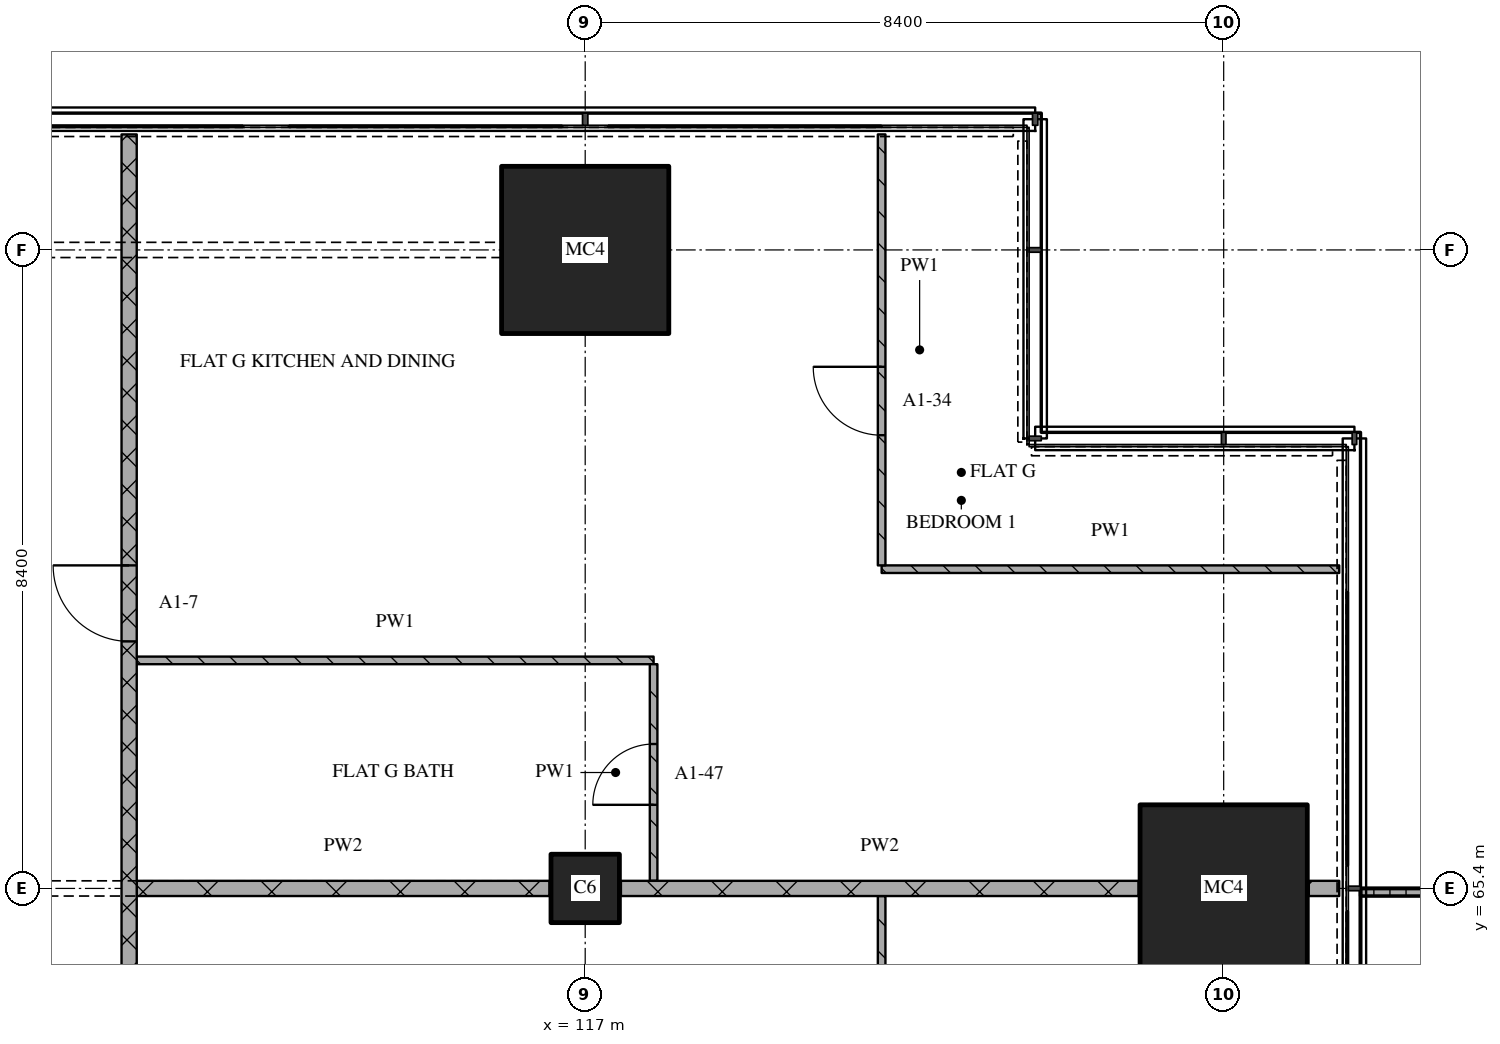
"""IFC4 building model, lengths in metres.
Left out: names, types, materials, properties, quantities, classifications, styles, units other than length and angle.
Written with IfcOpenShell. Run it as: python <this file> out.ifc"""

import sys

from ifc_helpers import new_model, si_unit, direction, frame, frame_2d, origin, origin_2d, place, context, subcontext, project, spatial, polyline, rectangle, outline, extrude, element, fill, save


model = new_model("IFC4")
c1 = context("Model", 3, precision=1e-05, world=origin(), true_north=direction((0.0, 1.0)))
c2 = subcontext(c1, "Body", "Model", "MODEL_VIEW")
j1 = project(units=[si_unit("LENGTHUNIT", "METRE"), si_unit("PLANEANGLEUNIT", "RADIAN")], contexts=[c1])
p1 = place(None, origin())
s1 = spatial("IfcSite", under=j1, at=p1, CompositionType="ELEMENT")
p2 = place(p1, origin())
s2 = spatial("IfcBuilding", under=s1, at=p2, CompositionType="ELEMENT")
p3 = place(p2, frame((0.0, 0.0, 44.4)))
s3 = spatial("IfcBuildingStorey", under=s2, at=p3, CompositionType="ELEMENT", Elevation=44.4)
p4 = place(p3, frame((117.0, 65.4, 0.0), z_axis=(0.0, 0.0, 1.0), x_axis=(1.0, 0.0, 0.0)))
e1 = element("IfcColumn", 1, at=p4, inside=s3, PredefinedType="COLUMN", context=c2, shape_type="SweptSolid", body=[
    extrude(rectangle(XDim=0.9, YDim=0.9, at=origin_2d()), origin(), (0.0, 0.0, 1.0), 3.6),
])
for number, where, z_axis, x_axis in (
    (2, (117.0, 73.8, 0.0), (0.0, 0.0, 1.0), (1.0, 0.0, 0.0)),
    (3, (125.4, 65.4, 0.0), (0.0, 0.0, 1.0), (1.0, 0.0, 0.0)),
):
    element("IfcColumn", number, at=place(p3, frame(where, z_axis=z_axis, x_axis=x_axis)), inside=s3, PredefinedType="COLUMN", context=c2, shape_type="SweptSolid", body=[
        extrude(rectangle(XDim=2.2, YDim=2.2, at=origin_2d()), origin(), (0.0, 0.0, 1.0), 3.6),
    ])
p5 = place(p3, origin())
e4 = element("IfcWall", 4, at=p5, inside=s3, PredefinedType="SOLIDWALL", context=c2, shape_type="SweptSolid", body=[
    extrude(outline(polyline([(127.2, 61.2), (127.2, 61.3), (128.833, 61.3), (128.833, 65.3), (127.2, 65.3), (127.2, 65.4), (128.933, 65.4), (128.933, 61.2), (127.2, 61.2)])), origin(), (0.0, 0.0, 1.0), 1.0),
])
p6 = place(p3, frame((111.1, 65.4, 0.0), z_axis=(0.0, 0.0, 1.0), x_axis=(1.0, 0.0, 0.0)))
e5 = element("IfcWall", 5, at=p6, inside=s3, PredefinedType="PARTITIONING", context=c2, shape_type="SweptSolid", body=[
    extrude(rectangle(XDim=5.43, YDim=0.2, at=frame_2d((2.715, 0.0))), origin(), (0.0, 0.0, 1.0), 2.82),
])
p7 = place(p3, frame((117.47, 65.4, 0.0), z_axis=(0.0, 0.0, 1.0), x_axis=(1.0, 0.0, 0.0)))
e6 = element("IfcWall", 6, at=p7, inside=s3, PredefinedType="PARTITIONING", context=c2, shape_type="SweptSolid", body=[
    extrude(rectangle(XDim=6.81, YDim=0.2, at=frame_2d((3.405, 0.0))), origin(), (0.0, 0.0, 1.0), 3.32),
])
p8 = place(p3, frame((126.52, 65.4, 0.0), z_axis=(0.0, 0.0, 1.0), x_axis=(1.0, 0.0, 0.0)))
e7 = element("IfcWall", 7, at=p8, inside=s3, PredefinedType="PARTITIONING", context=c2, shape_type="SweptSolid", body=[
    extrude(rectangle(XDim=0.4, YDim=0.2, at=frame_2d((0.2, 0.0))), origin(), (0.0, 0.0, 1.0), 3.32),
])
p9 = place(p3, frame((111.1, 68.4, 0.0), z_axis=(0.0, 0.0, 1.0), x_axis=(1.0, 0.0, 0.0)))
e8 = element("IfcWall", 8, at=p9, inside=s3, PredefinedType="PARTITIONING", context=c2, shape_type="SweptSolid", body=[
    extrude(rectangle(XDim=6.8, YDim=0.1, at=frame_2d((3.4, 0.0))), origin(), (0.0, 0.0, 1.0), 3.32),
])
p10 = place(p3, frame((120.9, 69.6, 0.0), z_axis=(0.0, 0.0, 1.0), x_axis=(1.0, 0.0, 0.0)))
e9 = element("IfcWall", 9, at=p10, inside=s3, PredefinedType="PARTITIONING", context=c2, shape_type="SweptSolid", body=[
    extrude(rectangle(XDim=6.02, YDim=0.1, at=frame_2d((3.01, 0.0))), origin(), (0.0, 0.0, 1.0), 3.32),
])
p11 = place(p3, frame((111.0, 75.32, 0.0), z_axis=(0.0, 0.0, 1.0), x_axis=(0.0, -1.0, 0.0)))
e10 = element("IfcWall", 10, at=p11, inside=s3, PredefinedType="PARTITIONING", context=c2, shape_type="SweptSolid", body=[
    extrude(rectangle(XDim=32.02, YDim=0.2, at=frame_2d((16.01, 0.0))), origin(), (0.0, 0.0, 1.0), 3.32),
])
p12 = place(p11, frame((5.67, 0.0, 0.0)))
e11 = element("IfcOpeningElement", 11, at=p12, cuts=e10, PredefinedType="OPENING", context=c2, shape_type="SweptSolid", body=[
    extrude(rectangle(XDim=1.0, YDim=2.1, at=frame_2d((0.5, 1.05))), frame((0.0, 0.11, 0.0), z_axis=(0.0, -1.0, 0.0), x_axis=(1.0, 0.0, 0.0)), (0.0, 0.0, 1.0), 0.22),
])
p13 = place(p3, frame((117.9, 65.5, 0.0), z_axis=(0.0, 0.0, 1.0), x_axis=(0.0, 1.0, 0.0)))
e12 = element("IfcWall", 12, at=p13, inside=s3, PredefinedType="PARTITIONING", context=c2, shape_type="SweptSolid", body=[
    extrude(rectangle(XDim=2.85, YDim=0.1, at=frame_2d((1.425, 0.0))), origin(), (0.0, 0.0, 1.0), 3.32),
])
p14 = place(p13, frame((1.0, 0.0, 0.0)))
e13 = element("IfcOpeningElement", 13, at=p14, cuts=e12, PredefinedType="OPENING", context=c2, shape_type="SweptSolid", body=[
    extrude(rectangle(XDim=0.8, YDim=2.1, at=frame_2d((0.4, 1.05))), frame((0.0, 0.06, 0.0), z_axis=(0.0, -1.0, 0.0), x_axis=(1.0, 0.0, 0.0)), (0.0, 0.0, 1.0), 0.12),
])
p15 = place(p3, frame((120.9, 55.491, 0.0), z_axis=(0.0, 0.0, 1.0), x_axis=(0.0, 1.0, 0.0)))
e14 = element("IfcWall", 14, at=p15, inside=s3, PredefinedType="PARTITIONING", context=c2, shape_type="SweptSolid", body=[
    extrude(rectangle(XDim=9.809, YDim=0.1, at=frame_2d((4.904, 0.0))), origin(), (0.0, 0.0, 1.0), 3.32),
])
p16 = place(p15, frame((4.479, 0.0, 0.0)))
e15 = element("IfcOpeningElement", 15, at=p16, cuts=e14, PredefinedType="OPENING", context=c2, shape_type="SweptSolid", body=[
    extrude(rectangle(XDim=0.9, YDim=2.1, at=frame_2d((0.45, 1.05))), frame((0.0, 0.06, 0.0), z_axis=(0.0, -1.0, 0.0), x_axis=(1.0, 0.0, 0.0)), (0.0, 0.0, 1.0), 0.12),
])
p17 = place(p3, frame((120.9, 75.32, 0.0), z_axis=(0.0, 0.0, 1.0), x_axis=(0.0, -1.0, 0.0)))
e16 = element("IfcWall", 16, at=p17, inside=s3, PredefinedType="PARTITIONING", context=c2, shape_type="SweptSolid", body=[
    extrude(rectangle(XDim=5.67, YDim=0.1, at=frame_2d((2.835, 0.0))), origin(), (0.0, 0.0, 1.0), 3.32),
])
p18 = place(p17, frame((3.058, 0.0, 0.0)))
e17 = element("IfcOpeningElement", 17, at=p18, cuts=e16, PredefinedType="OPENING", context=c2, shape_type="SweptSolid", body=[
    extrude(rectangle(XDim=0.9, YDim=2.1, at=frame_2d((0.45, 1.05))), frame((0.0, 0.06, 0.0), z_axis=(0.0, -1.0, 0.0), x_axis=(1.0, 0.0, 0.0)), (0.0, 0.0, 1.0), 0.12),
])
p19 = place(p12, origin())
e18 = element("IfcDoor", 18, at=p19, inside=s3, OperationType="SINGLE_SWING_RIGHT", PredefinedType="DOOR", context=c2, shape_type="SweptSolid", body=[
    extrude(rectangle(XDim=1.0, YDim=2.1, at=frame_2d((0.5, 1.05))), frame((0.0, 0.025, 0.0), z_axis=(0.0, -1.0, 0.0), x_axis=(1.0, 0.0, 0.0)), (0.0, 0.0, 1.0), 0.05),
])
fill(e11, e18)
p20 = place(p14, origin())
e19 = element("IfcDoor", 19, at=p20, inside=s3, OperationType="SINGLE_SWING_LEFT", PredefinedType="DOOR", context=c2, shape_type="SweptSolid", body=[
    extrude(rectangle(XDim=0.8, YDim=2.1, at=frame_2d((0.4, 1.05))), frame((0.0, 0.025, 0.0), z_axis=(0.0, -1.0, 0.0), x_axis=(1.0, 0.0, 0.0)), (0.0, 0.0, 1.0), 0.05),
])
fill(e13, e19)
p21 = place(p18, origin())
e20 = element("IfcDoor", 20, at=p21, inside=s3, OperationType="SINGLE_SWING_RIGHT", PredefinedType="DOOR", context=c2, shape_type="SweptSolid", body=[
    extrude(rectangle(XDim=0.9, YDim=2.1, at=frame_2d((0.45, 1.05))), frame((0.0, 0.025, 0.0), z_axis=(0.0, -1.0, 0.0), x_axis=(1.0, 0.0, 0.0)), (0.0, 0.0, 1.0), 0.05),
])
fill(e17, e20)
save(model, sys.argv[1])
